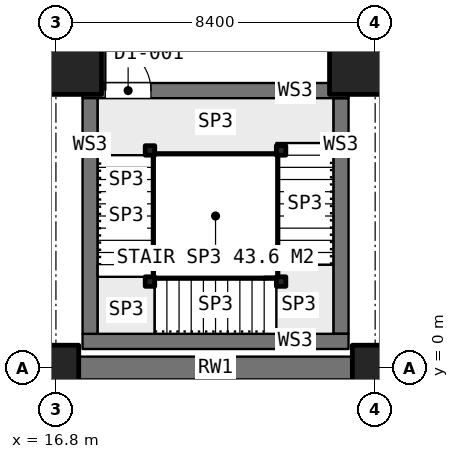
"""IFC4 building model, lengths in metres.
Left out: names, types, materials, properties, quantities, classifications, styles, units other than length and angle.
Written with IfcOpenShell. Run it as: python <this file> out.ifc"""

import sys

from ifc_helpers import new_model, si_unit, direction, frame, frame_2d, origin, origin_2d, place, context, subcontext, project, spatial, rectangle, extrude, element, fill, save


model = new_model("IFC4")
c1 = context("Model", 3, precision=1e-05, world=origin(), true_north=direction((0.0, 1.0)))
c2 = subcontext(c1, "Body", "Model", "MODEL_VIEW")
j1 = project(units=[si_unit("LENGTHUNIT", "METRE"), si_unit("PLANEANGLEUNIT", "RADIAN")], contexts=[c1])
p1 = place(None, origin())
s1 = spatial("IfcSite", under=j1, at=p1, CompositionType="ELEMENT")
p2 = place(p1, origin())
s2 = spatial("IfcBuilding", under=s1, at=p2, CompositionType="ELEMENT")
p3 = place(p2, frame((0.0, 0.0, -9.9)))
s3 = spatial("IfcBuildingStorey", under=s2, at=p3, CompositionType="ELEMENT", Elevation=-9.9)
p4 = place(p3, frame((16.8, 0.0, 0.0), z_axis=(0.0, 0.0, 1.0), x_axis=(1.0, 0.0, 0.0)))
e1 = element("IfcColumn", 1, at=p4, inside=s3, PredefinedType="COLUMN", context=c2, shape_type="SweptSolid", body=[
    extrude(rectangle(XDim=1.2, YDim=1.2, at=origin_2d()), origin(), (0.0, 0.0, 1.0), 4.5),
])
p5 = place(p3, frame((16.8, 8.4, 0.0), z_axis=(0.0, 0.0, 1.0), x_axis=(1.0, 0.0, 0.0)))
e2 = element("IfcColumn", 2, at=p5, inside=s3, PredefinedType="COLUMN", context=c2, shape_type="SweptSolid", body=[
    extrude(rectangle(XDim=2.4, YDim=2.4, at=origin_2d()), origin(), (0.0, 0.0, 1.0), 4.5),
])
p6 = place(p3, frame((25.2, 0.0, 0.0), z_axis=(0.0, 0.0, 1.0), x_axis=(1.0, 0.0, 0.0)))
e3 = element("IfcColumn", 3, at=p6, inside=s3, PredefinedType="COLUMN", context=c2, shape_type="SweptSolid", body=[
    extrude(rectangle(XDim=1.2, YDim=1.2, at=origin_2d()), origin(), (0.0, 0.0, 1.0), 4.5),
])
p7 = place(p3, frame((25.2, 8.4, 0.0), z_axis=(0.0, 0.0, 1.0), x_axis=(1.0, 0.0, 0.0)))
e4 = element("IfcColumn", 4, at=p7, inside=s3, PredefinedType="COLUMN", context=c2, shape_type="SweptSolid", body=[
    extrude(rectangle(XDim=2.4, YDim=2.4, at=origin_2d()), origin(), (0.0, 0.0, 1.0), 4.5),
])
p8 = place(p3, frame((17.4, 0.0, 0.0), z_axis=(0.0, 0.0, 1.0), x_axis=(1.0, 0.0, 0.0)))
e5 = element("IfcWall", 5, at=p8, inside=s3, PredefinedType="SOLIDWALL", context=c2, shape_type="SweptSolid", body=[
    extrude(rectangle(XDim=7.2, YDim=0.6, at=frame_2d((3.6, 0.0))), origin(), (0.0, 0.0, 1.0), 4.2),
])
p9 = place(p3, frame((17.5, 0.7, 0.0), z_axis=(0.0, 0.0, 1.0), x_axis=(1.0, 0.0, 0.0)))
e6 = element("IfcWall", 6, at=p9, inside=s3, PredefinedType="SOLIDWALL", context=c2, shape_type="SweptSolid", body=[
    extrude(rectangle(XDim=7.0, YDim=0.4, at=frame_2d((3.5, 0.0))), origin(), (0.0, 0.0, 1.0), 4.2),
])
p10 = place(p3, frame((17.5, 7.3, 0.0), z_axis=(0.0, 0.0, 1.0), x_axis=(1.0, 0.0, 0.0)))
e7 = element("IfcWall", 7, at=p10, inside=s3, PredefinedType="SOLIDWALL", context=c2, shape_type="SweptSolid", body=[
    extrude(rectangle(XDim=7.0, YDim=0.4, at=frame_2d((3.5, 0.0))), origin(), (0.0, 0.0, 1.0), 4.2),
])
p11 = place(p10, frame((0.6, 0.0, 0.0)))
e8 = element("IfcOpeningElement", 8, at=p11, cuts=e7, PredefinedType="OPENING", context=c2, shape_type="SweptSolid", body=[
    extrude(rectangle(XDim=1.2, YDim=2.1, at=frame_2d((0.6, 1.05))), frame((0.0, 0.21, 0.0), z_axis=(0.0, -1.0, 0.0), x_axis=(1.0, 0.0, 0.0)), (0.0, 0.0, 1.0), 0.42),
])
for number, where, z_axis, x_axis in (
    (9, (17.7, 0.9, 0.0), (0.0, 0.0, 1.0), (0.0, 1.0, 0.0)),
    (10, (24.3, 0.9, 0.0), (0.0, 0.0, 1.0), (0.0, 1.0, 0.0)),
):
    element("IfcWall", number, at=place(p3, frame(where, z_axis=z_axis, x_axis=x_axis)), inside=s3, PredefinedType="SOLIDWALL", context=c2, shape_type="SweptSolid", body=[
        extrude(rectangle(XDim=6.2, YDim=0.4, at=frame_2d((3.1, 0.0))), origin(), (0.0, 0.0, 1.0), 4.2),
    ])
for number, where, z_axis, x_axis in (
    (11, (19.275, 5.725, 0.0), (0.0, 0.0, 1.0), (1.0, 0.0, 0.0)),
    (12, (19.275, 2.275, 0.0), (0.0, 0.0, 1.0), (1.0, 0.0, 0.0)),
    (13, (22.725, 2.275, 0.0), (0.0, 0.0, 1.0), (1.0, 0.0, 0.0)),
    (14, (22.725, 5.725, 0.0), (0.0, 0.0, 1.0), (1.0, 0.0, 0.0)),
):
    element("IfcColumn", number, at=place(p3, frame(where, z_axis=z_axis, x_axis=x_axis)), inside=s3, PredefinedType="COLUMN", context=c2, shape_type="SweptSolid", body=[
        extrude(rectangle(XDim=0.25, YDim=0.25, at=origin_2d()), origin(), (0.0, 0.0, 1.0), 4.5),
    ])
p12 = place(p11, origin())
e15 = element("IfcDoor", 15, at=p12, inside=s3, OperationType="SINGLE_SWING_RIGHT", PredefinedType="DOOR", context=c2, shape_type="SweptSolid", body=[
    extrude(rectangle(XDim=1.2, YDim=2.1, at=frame_2d((0.6, 1.05))), frame((0.0, 0.025, 0.0), z_axis=(0.0, -1.0, 0.0), x_axis=(1.0, 0.0, 0.0)), (0.0, 0.0, 1.0), 0.05),
])
fill(e8, e15)
save(model, sys.argv[1])
